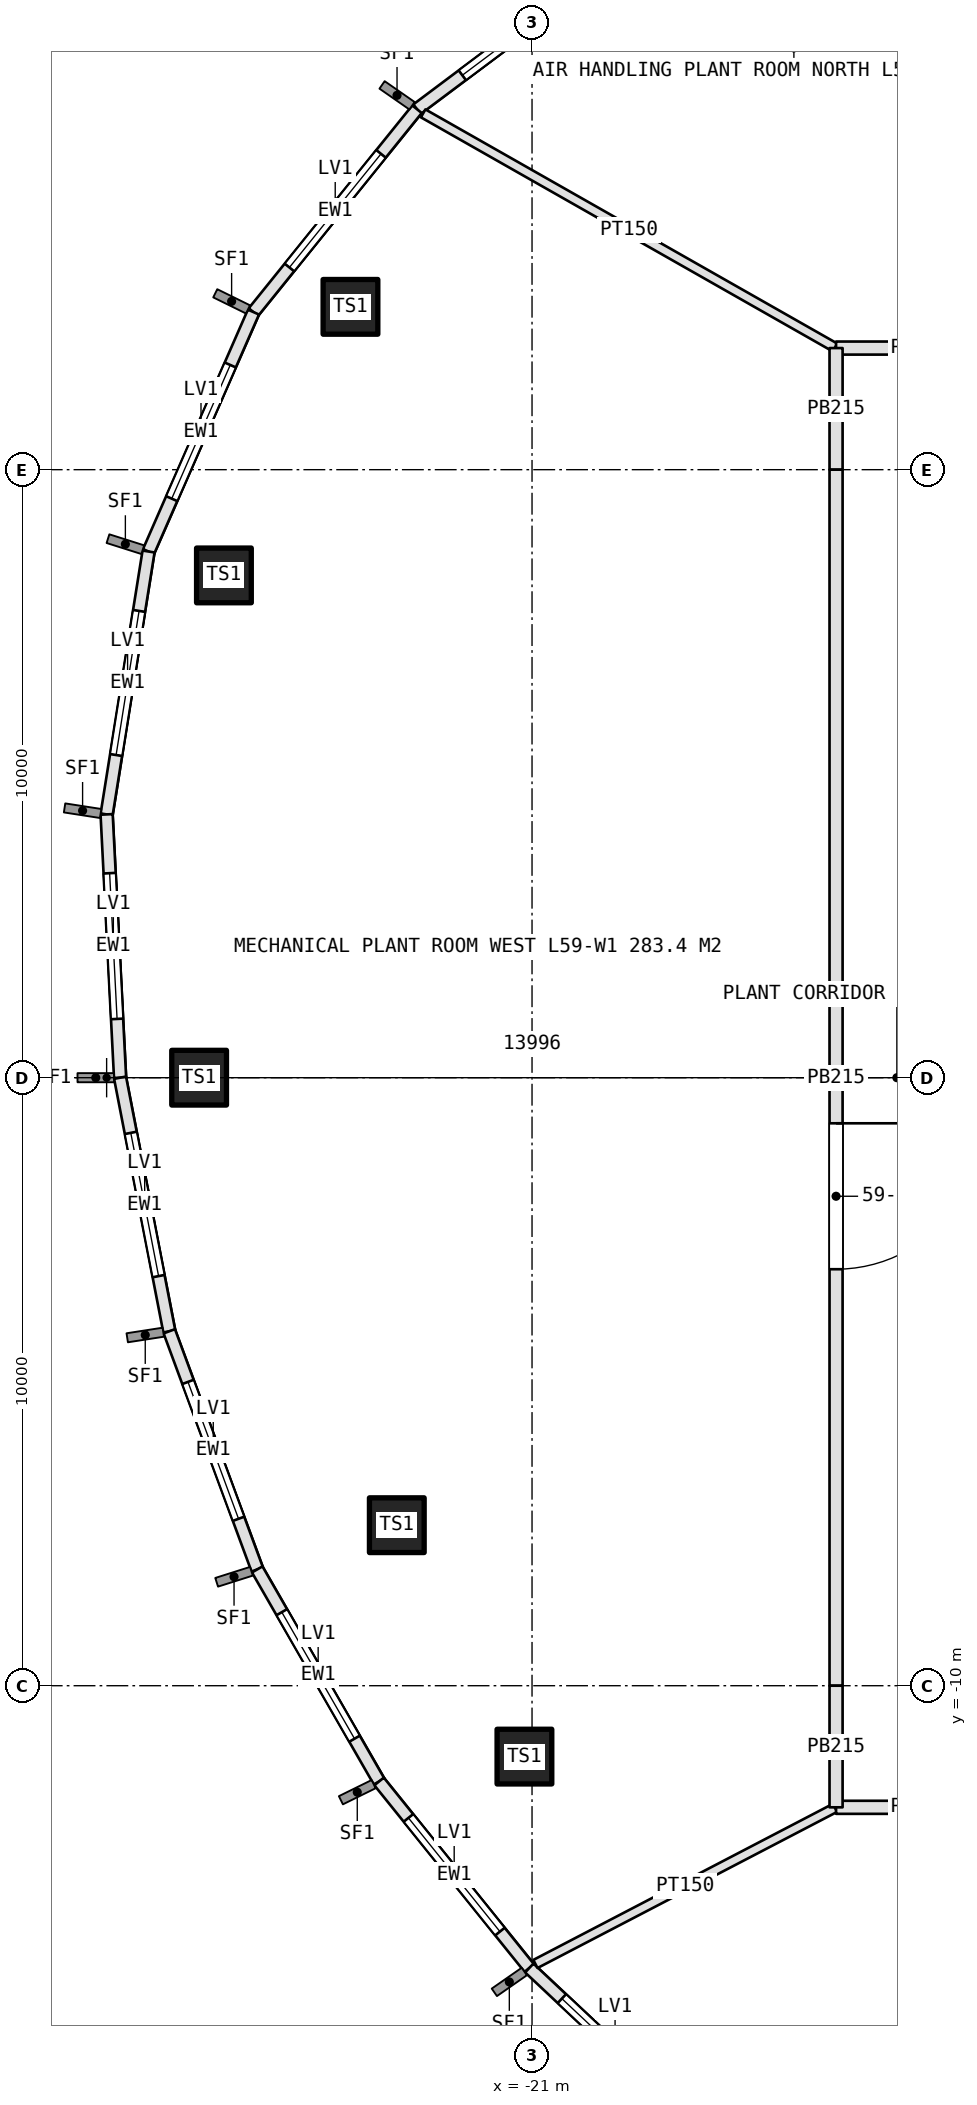
"""IFC4 building model, lengths in metres.
Left out: names, types, materials, properties, quantities, classifications, styles, units other than length and angle.
Written with IfcOpenShell. Run it as: python <this file> out.ifc"""

import sys

from ifc_helpers import new_model, si_unit, direction, frame, frame_2d, origin, origin_2d, place, context, subcontext, project, spatial, rectangle, hollow_rectangle, extrude, element, fill, save


model = new_model("IFC4")
c1 = context("Model", 3, precision=1e-05, world=origin(), true_north=direction((0.0, 1.0)))
c2 = subcontext(c1, "Body", "Model", "MODEL_VIEW")
j1 = project(units=[si_unit("LENGTHUNIT", "METRE"), si_unit("PLANEANGLEUNIT", "RADIAN")], contexts=[c1])
p1 = place(None, origin())
s1 = spatial("IfcSite", under=j1, at=p1, CompositionType="ELEMENT")
p2 = place(p1, origin())
s2 = spatial("IfcBuilding", under=s1, at=p2, CompositionType="ELEMENT")
p3 = place(p2, frame((0.0, 0.0, 266.2)))
s3 = spatial("IfcBuildingStorey", under=s2, at=p3, CompositionType="ELEMENT", Elevation=266.2)
p4 = place(p3, frame((-23.986, 12.678, 0.775), z_axis=(0.604865513716, -0.319646055674, 0.729358697356), x_axis=(0.467228978727, 0.884136347764, 0.0)))
e1 = element("IfcColumn", 1, at=p4, inside=s3, PredefinedType="COLUMN", context=c2, shape_type="SweptSolid", body=[
    extrude(hollow_rectangle(XDim=0.9, YDim=0.9, WallThickness=0.08, at=origin_2d()), origin(), (0.0, 0.0, 1.0), 4.73),
])
p5 = place(p3, frame((-26.067, 8.261, 0.775), z_axis=(0.623392642344, -0.197554006377, 0.756540830382), x_axis=(0.302095077495, 0.953277800095, 0.0)))
e2 = element("IfcColumn", 2, at=p5, inside=s3, PredefinedType="COLUMN", context=c2, shape_type="SweptSolid", body=[
    extrude(hollow_rectangle(XDim=0.9, YDim=0.9, WallThickness=0.08, at=origin_2d()), origin(), (0.0, 0.0, 1.0), 4.56),
])
p6 = place(p3, frame((-26.475, 0.0, 0.775), z_axis=(0.487268631782, 0.0, 0.873252128816), x_axis=(0.0, 1.0, 0.0)))
e3 = element("IfcColumn", 3, at=p6, inside=s3, PredefinedType="COLUMN", context=c2, shape_type="SweptSolid", body=[
    extrude(hollow_rectangle(XDim=0.9, YDim=0.9, WallThickness=0.08, at=origin_2d()), origin(), (0.0, 0.0, 1.0), 3.951),
])
for number, where, z_axis, x_axis in (
    (4, (-23.224, -7.36, 0.0), (0.0, 0.0, 1.0), (1.0, 0.0, 0.0)),
    (5, (-21.125, -11.166, 0.0), (0.0, 0.0, 1.0), (1.0, 0.0, 0.0)),
):
    element("IfcColumn", number, at=place(p3, frame(where, z_axis=z_axis, x_axis=x_axis)), inside=s3, PredefinedType="COLUMN", context=c2, shape_type="SweptSolid", body=[
        extrude(hollow_rectangle(XDim=0.9, YDim=0.9, WallThickness=0.08, at=origin_2d()), origin(), (0.0, 0.0, 1.0), 5.0),
    ])
p7 = place(p3, frame((-19.481, 18.485, 0.0), z_axis=(0.0, 0.0, 1.0), x_axis=(-0.800137420308, -0.599816729195, 0.0)))
e6 = element("IfcWall", 6, at=p7, inside=s3, PredefinedType="SOLIDWALL", context=c2, shape_type="SweptSolid", body=[
    extrude(rectangle(XDim=4.263, YDim=0.2, at=frame_2d((2.132, 0.0))), origin(), (0.0, 0.0, 1.0), 5.0),
])
p8 = place(p7, frame((0.932, 0.0, 1.6)))
e7 = element("IfcOpeningElement", 7, at=p8, cuts=e6, PredefinedType="OPENING", context=c2, shape_type="SweptSolid", body=[
    extrude(rectangle(XDim=2.4, YDim=1.8, at=frame_2d((1.2, 0.9))), frame((0.0, 0.11, 0.0), z_axis=(0.0, -1.0, 0.0), x_axis=(1.0, 0.0, 0.0)), (0.0, 0.0, 1.0), 0.22),
])
p9 = place(p3, frame((-22.892, 15.928, 0.0), z_axis=(0.0, 0.0, 1.0), x_axis=(-0.627615481418, -0.778523479083, 0.0)))
e8 = element("IfcWall", 8, at=p9, inside=s3, PredefinedType="SOLIDWALL", context=c2, shape_type="SweptSolid", body=[
    extrude(rectangle(XDim=4.286, YDim=0.2, at=frame_2d((2.143, 0.0))), origin(), (0.0, 0.0, 1.0), 5.0),
])
p10 = place(p9, frame((0.943, 0.0, 1.6)))
e9 = element("IfcOpeningElement", 9, at=p10, cuts=e8, PredefinedType="OPENING", context=c2, shape_type="SweptSolid", body=[
    extrude(rectangle(XDim=2.4, YDim=1.8, at=frame_2d((1.2, 0.9))), frame((0.0, 0.11, 0.0), z_axis=(0.0, -1.0, 0.0), x_axis=(1.0, 0.0, 0.0)), (0.0, 0.0, 1.0), 0.22),
])
p11 = place(p3, frame((-25.582, 12.592, 0.0), z_axis=(0.0, 0.0, 1.0), x_axis=(-0.401274589955, -0.915957806592, 0.0)))
e10 = element("IfcWall", 10, at=p11, inside=s3, PredefinedType="SOLIDWALL", context=c2, shape_type="SweptSolid", body=[
    extrude(rectangle(XDim=4.299, YDim=0.2, at=frame_2d((2.149, 0.0))), origin(), (0.0, 0.0, 1.0), 5.0),
])
p12 = place(p11, frame((0.95, 0.0, 1.6)))
e11 = element("IfcOpeningElement", 11, at=p12, cuts=e10, PredefinedType="OPENING", context=c2, shape_type="SweptSolid", body=[
    extrude(rectangle(XDim=2.4, YDim=1.8, at=frame_2d((1.2, 0.9))), frame((0.0, 0.11, 0.0), z_axis=(0.0, -1.0, 0.0), x_axis=(1.0, 0.0, 0.0)), (0.0, 0.0, 1.0), 0.22),
])
p13 = place(p3, frame((-27.307, 8.654, 0.0), z_axis=(0.0, 0.0, 1.0), x_axis=(-0.157459866389, -0.987525387257, 0.0)))
e12 = element("IfcWall", 12, at=p13, inside=s3, PredefinedType="SOLIDWALL", context=c2, shape_type="SweptSolid", body=[
    extrude(rectangle(XDim=4.379, YDim=0.2, at=frame_2d((2.189, 0.0))), origin(), (0.0, 0.0, 1.0), 5.0),
])
p14 = place(p13, frame((0.989, 0.0, 1.6)))
e13 = element("IfcOpeningElement", 13, at=p14, cuts=e12, PredefinedType="OPENING", context=c2, shape_type="SweptSolid", body=[
    extrude(rectangle(XDim=2.4, YDim=1.8, at=frame_2d((1.2, 0.9))), frame((0.0, 0.11, 0.0), z_axis=(0.0, -1.0, 0.0), x_axis=(1.0, 0.0, 0.0)), (0.0, 0.0, 1.0), 0.22),
])
p15 = place(p3, frame((-27.996, 4.33, 0.0), z_axis=(0.0, 0.0, 1.0), x_axis=(0.051016026063, -0.998697834725, 0.0)))
e14 = element("IfcWall", 14, at=p15, inside=s3, PredefinedType="SOLIDWALL", context=c2, shape_type="SweptSolid", body=[
    extrude(rectangle(XDim=4.336, YDim=0.2, at=frame_2d((2.168, 0.0))), origin(), (0.0, 0.0, 1.0), 5.0),
])
p16 = place(p15, frame((0.968, 0.0, 1.6)))
e15 = element("IfcOpeningElement", 15, at=p16, cuts=e14, PredefinedType="OPENING", context=c2, shape_type="SweptSolid", body=[
    extrude(rectangle(XDim=2.4, YDim=1.8, at=frame_2d((1.2, 0.9))), frame((0.0, 0.11, 0.0), z_axis=(0.0, -1.0, 0.0), x_axis=(1.0, 0.0, 0.0)), (0.0, 0.0, 1.0), 0.22),
])
p17 = place(p3, frame((-27.775, 0.0, 0.0), z_axis=(0.0, 0.0, 1.0), x_axis=(0.190498959365, -0.981687397536, 0.0)))
e16 = element("IfcWall", 16, at=p17, inside=s3, PredefinedType="SOLIDWALL", context=c2, shape_type="SweptSolid", body=[
    extrude(rectangle(XDim=4.249, YDim=0.2, at=frame_2d((2.124, 0.0))), origin(), (0.0, 0.0, 1.0), 5.0),
])
p18 = place(p17, frame((0.924, 0.0, 1.6)))
e17 = element("IfcOpeningElement", 17, at=p18, cuts=e16, PredefinedType="OPENING", context=c2, shape_type="SweptSolid", body=[
    extrude(rectangle(XDim=2.4, YDim=1.8, at=frame_2d((1.2, 0.9))), frame((0.0, 0.11, 0.0), z_axis=(0.0, -1.0, 0.0), x_axis=(1.0, 0.0, 0.0)), (0.0, 0.0, 1.0), 0.22),
])
p19 = place(p3, frame((-26.966, -4.171, 0.0), z_axis=(0.0, 0.0, 1.0), x_axis=(0.346377249231, -0.938095304974, 0.0)))
e18 = element("IfcWall", 18, at=p19, inside=s3, PredefinedType="SOLIDWALL", context=c2, shape_type="SweptSolid", body=[
    extrude(rectangle(XDim=4.176, YDim=0.2, at=frame_2d((2.088, 0.0))), origin(), (0.0, 0.0, 1.0), 5.0),
])
p20 = place(p19, frame((0.888, 0.0, 1.6)))
e19 = element("IfcOpeningElement", 19, at=p20, cuts=e18, PredefinedType="OPENING", context=c2, shape_type="SweptSolid", body=[
    extrude(rectangle(XDim=2.4, YDim=1.8, at=frame_2d((1.2, 0.9))), frame((0.0, 0.11, 0.0), z_axis=(0.0, -1.0, 0.0), x_axis=(1.0, 0.0, 0.0)), (0.0, 0.0, 1.0), 0.22),
])
p21 = place(p3, frame((-25.519, -8.088, 0.0), z_axis=(0.0, 0.0, 1.0), x_axis=(0.498255552443, -0.867030221192, 0.0)))
e20 = element("IfcWall", 20, at=p21, inside=s3, PredefinedType="SOLIDWALL", context=c2, shape_type="SweptSolid", body=[
    extrude(rectangle(XDim=4.022, YDim=0.2, at=frame_2d((2.011, 0.0))), origin(), (0.0, 0.0, 1.0), 5.0),
])
p22 = place(p21, frame((0.811, 0.0, 1.6)))
e21 = element("IfcOpeningElement", 21, at=p22, cuts=e20, PredefinedType="OPENING", context=c2, shape_type="SweptSolid", body=[
    extrude(rectangle(XDim=2.4, YDim=1.8, at=frame_2d((1.2, 0.9))), frame((0.0, 0.11, 0.0), z_axis=(0.0, -1.0, 0.0), x_axis=(1.0, 0.0, 0.0)), (0.0, 0.0, 1.0), 0.22),
])
p23 = place(p3, frame((-23.515, -11.575, 0.0), z_axis=(0.0, 0.0, 1.0), x_axis=(0.627065360289, -0.778966644937, 0.0)))
e22 = element("IfcWall", 22, at=p23, inside=s3, PredefinedType="SOLIDWALL", context=c2, shape_type="SweptSolid", body=[
    extrude(rectangle(XDim=3.939, YDim=0.2, at=frame_2d((1.97, 0.0))), origin(), (0.0, 0.0, 1.0), 5.0),
])
p24 = place(p23, frame((0.77, 0.0, 1.6)))
e23 = element("IfcOpeningElement", 23, at=p24, cuts=e22, PredefinedType="OPENING", context=c2, shape_type="SweptSolid", body=[
    extrude(rectangle(XDim=2.4, YDim=1.8, at=frame_2d((1.2, 0.9))), frame((0.0, 0.11, 0.0), z_axis=(0.0, -1.0, 0.0), x_axis=(1.0, 0.0, 0.0)), (0.0, 0.0, 1.0), 0.22),
])
p25 = place(p3, frame((-21.045, -14.643, 0.0), z_axis=(0.0, 0.0, 1.0), x_axis=(0.729084595906, -0.684423591069, 0.0)))
e24 = element("IfcWall", 24, at=p25, inside=s3, PredefinedType="SOLIDWALL", context=c2, shape_type="SweptSolid", body=[
    extrude(rectangle(XDim=3.87, YDim=0.2, at=frame_2d((1.935, 0.0))), origin(), (0.0, 0.0, 1.0), 5.0),
])
p26 = place(p25, frame((0.735, 0.0, 1.6)))
e25 = element("IfcOpeningElement", 25, at=p26, cuts=e24, PredefinedType="OPENING", context=c2, shape_type="SweptSolid", body=[
    extrude(rectangle(XDim=2.4, YDim=1.8, at=frame_2d((1.2, 0.9))), frame((0.0, 0.11, 0.0), z_axis=(0.0, -1.0, 0.0), x_axis=(1.0, 0.0, 0.0)), (0.0, 0.0, 1.0), 0.22),
])
p27 = place(p3, frame((-16.018, -12.009, 0.0), z_axis=(0.0, 0.0, 1.0), x_axis=(-0.886831549241, -0.462092851351, 0.0)))
e26 = element("IfcWall", 26, at=p27, inside=s3, PredefinedType="PARTITIONING", context=c2, shape_type="SweptSolid", body=[
    extrude(rectangle(XDim=5.555, YDim=0.15, at=frame_2d((2.778, 0.0))), origin(), (0.0, 0.0, 1.0), 4.2),
])
p28 = place(p3, frame((-16.017, 12.01, 0.0), z_axis=(0.0, 0.0, 1.0), x_axis=(-0.869357432803, 0.494183826151, 0.0)))
e27 = element("IfcWall", 27, at=p28, inside=s3, PredefinedType="PARTITIONING", context=c2, shape_type="SweptSolid", body=[
    extrude(rectangle(XDim=7.791, YDim=0.15, at=frame_2d((3.896, 0.0))), origin(), (0.0, 0.0, 1.0), 4.2),
])
for number, where, z_axis, x_axis in (
    (28, (-14.0, 12.0, 0.0), (0.0, 0.0, 1.0), (-1.0, 0.0, 0.0)),
    (29, (-16.0, -12.0, 0.0), (0.0, 0.0, 1.0), (1.0, 0.0, 0.0)),
    (30, (-16.0, 12.0, 0.0), (0.0, 0.0, 1.0), (0.0, -1.0, 0.0)),
):
    element("IfcWall", number, at=place(p3, frame(where, z_axis=z_axis, x_axis=x_axis)), inside=s3, PredefinedType="PARTITIONING", context=c2, shape_type="SweptSolid", body=[
        extrude(rectangle(XDim=2.0, YDim=0.215, at=frame_2d((1.0, 0.0))), origin(), (0.0, 0.0, 1.0), 4.2),
    ])
p29 = place(p3, frame((-16.0, 10.0, 0.0), z_axis=(0.0, 0.0, 1.0), x_axis=(0.0, -1.0, 0.0)))
e31 = element("IfcWall", 31, at=p29, inside=s3, PredefinedType="PARTITIONING", context=c2, shape_type="SweptSolid", body=[
    extrude(rectangle(XDim=20.0, YDim=0.215, at=frame_2d((10.0, 0.0))), origin(), (0.0, 0.0, 1.0), 4.2),
])
p30 = place(p29, frame((10.75, 0.0, 0.0)))
e32 = element("IfcOpeningElement", 32, at=p30, cuts=e31, PredefinedType="OPENING", context=c2, shape_type="SweptSolid", body=[
    extrude(rectangle(XDim=2.4, YDim=2.4, at=frame_2d((1.2, 1.2))), frame((0.0, 0.118, 0.0), z_axis=(0.0, -1.0, 0.0), x_axis=(1.0, 0.0, 0.0)), (0.0, 0.0, 1.0), 0.235),
])
p31 = place(p3, frame((-16.0, -10.0, 0.0), z_axis=(0.0, 0.0, 1.0), x_axis=(0.0, -1.0, 0.0)))
e33 = element("IfcWall", 33, at=p31, inside=s3, PredefinedType="PARTITIONING", context=c2, shape_type="SweptSolid", body=[
    extrude(rectangle(XDim=2.0, YDim=0.215, at=frame_2d((1.0, 0.0))), origin(), (0.0, 0.0, 1.0), 4.2),
])
p32 = place(p8, origin())
e34 = element("IfcWindow", 34, at=p32, inside=s3, PartitioningType="SINGLE_PANEL", PredefinedType="WINDOW", context=c2, shape_type="SweptSolid", body=[
    extrude(rectangle(XDim=2.4, YDim=1.8, at=frame_2d((1.2, 0.9))), frame((0.0, 0.03, 0.0), z_axis=(0.0, -1.0, 0.0), x_axis=(1.0, 0.0, 0.0)), (0.0, 0.0, 1.0), 0.06),
])
fill(e7, e34)
p33 = place(p10, origin())
e35 = element("IfcWindow", 35, at=p33, inside=s3, PartitioningType="SINGLE_PANEL", PredefinedType="WINDOW", context=c2, shape_type="SweptSolid", body=[
    extrude(rectangle(XDim=2.4, YDim=1.8, at=frame_2d((1.2, 0.9))), frame((0.0, 0.03, 0.0), z_axis=(0.0, -1.0, 0.0), x_axis=(1.0, 0.0, 0.0)), (0.0, 0.0, 1.0), 0.06),
])
fill(e9, e35)
p34 = place(p12, origin())
e36 = element("IfcWindow", 36, at=p34, inside=s3, PartitioningType="SINGLE_PANEL", PredefinedType="WINDOW", context=c2, shape_type="SweptSolid", body=[
    extrude(rectangle(XDim=2.4, YDim=1.8, at=frame_2d((1.2, 0.9))), frame((0.0, 0.03, 0.0), z_axis=(0.0, -1.0, 0.0), x_axis=(1.0, 0.0, 0.0)), (0.0, 0.0, 1.0), 0.06),
])
fill(e11, e36)
p35 = place(p14, origin())
e37 = element("IfcWindow", 37, at=p35, inside=s3, PartitioningType="SINGLE_PANEL", PredefinedType="WINDOW", context=c2, shape_type="SweptSolid", body=[
    extrude(rectangle(XDim=2.4, YDim=1.8, at=frame_2d((1.2, 0.9))), frame((0.0, 0.03, 0.0), z_axis=(0.0, -1.0, 0.0), x_axis=(1.0, 0.0, 0.0)), (0.0, 0.0, 1.0), 0.06),
])
fill(e13, e37)
p36 = place(p16, origin())
e38 = element("IfcWindow", 38, at=p36, inside=s3, PartitioningType="SINGLE_PANEL", PredefinedType="WINDOW", context=c2, shape_type="SweptSolid", body=[
    extrude(rectangle(XDim=2.4, YDim=1.8, at=frame_2d((1.2, 0.9))), frame((0.0, 0.03, 0.0), z_axis=(0.0, -1.0, 0.0), x_axis=(1.0, 0.0, 0.0)), (0.0, 0.0, 1.0), 0.06),
])
fill(e15, e38)
p37 = place(p18, origin())
e39 = element("IfcWindow", 39, at=p37, inside=s3, PartitioningType="SINGLE_PANEL", PredefinedType="WINDOW", context=c2, shape_type="SweptSolid", body=[
    extrude(rectangle(XDim=2.4, YDim=1.8, at=frame_2d((1.2, 0.9))), frame((0.0, 0.03, 0.0), z_axis=(0.0, -1.0, 0.0), x_axis=(1.0, 0.0, 0.0)), (0.0, 0.0, 1.0), 0.06),
])
fill(e17, e39)
p38 = place(p20, origin())
e40 = element("IfcWindow", 40, at=p38, inside=s3, PartitioningType="SINGLE_PANEL", PredefinedType="WINDOW", context=c2, shape_type="SweptSolid", body=[
    extrude(rectangle(XDim=2.4, YDim=1.8, at=frame_2d((1.2, 0.9))), frame((0.0, 0.03, 0.0), z_axis=(0.0, -1.0, 0.0), x_axis=(1.0, 0.0, 0.0)), (0.0, 0.0, 1.0), 0.06),
])
fill(e19, e40)
p39 = place(p22, origin())
e41 = element("IfcWindow", 41, at=p39, inside=s3, PartitioningType="SINGLE_PANEL", PredefinedType="WINDOW", context=c2, shape_type="SweptSolid", body=[
    extrude(rectangle(XDim=2.4, YDim=1.8, at=frame_2d((1.2, 0.9))), frame((0.0, 0.03, 0.0), z_axis=(0.0, -1.0, 0.0), x_axis=(1.0, 0.0, 0.0)), (0.0, 0.0, 1.0), 0.06),
])
fill(e21, e41)
p40 = place(p24, origin())
e42 = element("IfcWindow", 42, at=p40, inside=s3, PartitioningType="SINGLE_PANEL", PredefinedType="WINDOW", context=c2, shape_type="SweptSolid", body=[
    extrude(rectangle(XDim=2.4, YDim=1.8, at=frame_2d((1.2, 0.9))), frame((0.0, 0.03, 0.0), z_axis=(0.0, -1.0, 0.0), x_axis=(1.0, 0.0, 0.0)), (0.0, 0.0, 1.0), 0.06),
])
fill(e23, e42)
p41 = place(p26, origin())
e43 = element("IfcWindow", 43, at=p41, inside=s3, PartitioningType="SINGLE_PANEL", PredefinedType="WINDOW", context=c2, shape_type="SweptSolid", body=[
    extrude(rectangle(XDim=2.4, YDim=1.8, at=frame_2d((1.2, 0.9))), frame((0.0, 0.03, 0.0), z_axis=(0.0, -1.0, 0.0), x_axis=(1.0, 0.0, 0.0)), (0.0, 0.0, 1.0), 0.06),
])
fill(e25, e43)
p42 = place(p30, origin())
e44 = element("IfcDoor", 44, at=p42, inside=s3, OperationType="DOUBLE_DOOR_SINGLE_SWING", PredefinedType="DOOR", context=c2, shape_type="SweptSolid", body=[
    extrude(rectangle(XDim=2.4, YDim=2.4, at=frame_2d((1.2, 1.2))), frame((0.0, 0.025, 0.0), z_axis=(0.0, -1.0, 0.0), x_axis=(1.0, 0.0, 0.0)), (0.0, 0.0, 1.0), 0.05),
])
fill(e32, e44)
save(model, sys.argv[1])
